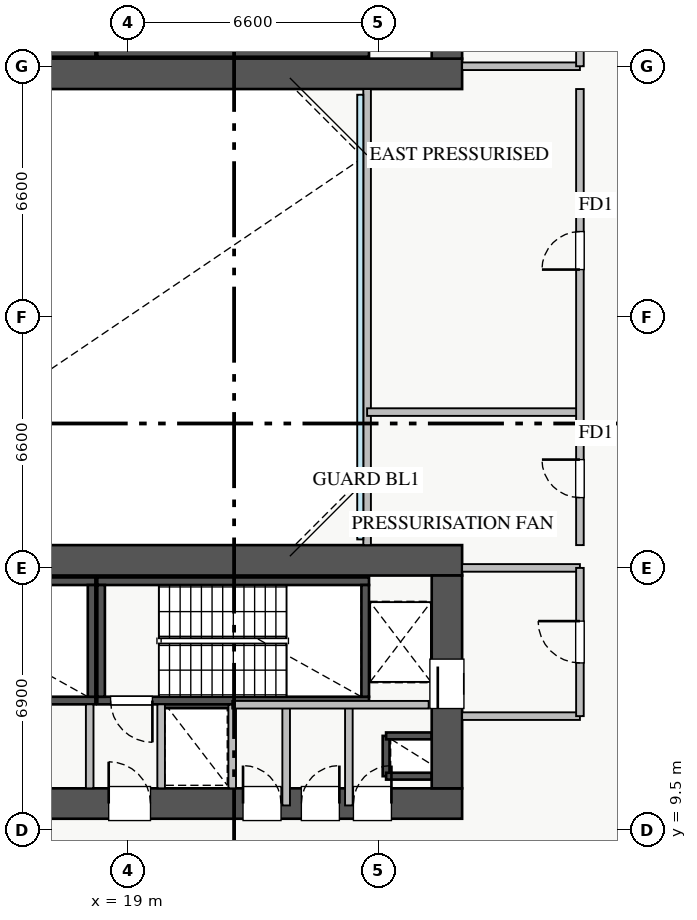
"""IFC4 building model, lengths in metres.
Left out: names, types, materials, properties, quantities, classifications, styles, units other than length and angle.
Written with IfcOpenShell. Run it as: python <this file> out.ifc"""

import sys

from ifc_helpers import new_model, si_unit, direction, frame, frame_2d, origin, place, context, subcontext, project, spatial, rectangle, extrude, source, transform, mapped, element, fill, save


model = new_model("IFC4")
c1 = context("Model", 3, precision=1e-05, world=origin(), true_north=direction((0.0, 1.0)))
c2 = subcontext(c1, "Body", "Model", "MODEL_VIEW")
j1 = project(units=[si_unit("LENGTHUNIT", "METRE"), si_unit("PLANEANGLEUNIT", "RADIAN")], contexts=[c1])
p1 = place(None, origin())
s1 = spatial("IfcSite", under=j1, at=p1, CompositionType="ELEMENT")
p2 = place(p1, origin())
s2 = spatial("IfcBuilding", under=s1, at=p2, CompositionType="ELEMENT")
p3 = place(p2, frame((0.0, 0.0, 92.5)))
s3 = spatial("IfcBuildingStorey", under=s2, at=p3, CompositionType="ELEMENT", Elevation=92.5)
p4 = place(p3, frame((25.8, 10.92, 0.0), z_axis=(0.0, 0.0, 1.0), x_axis=(0.0, 1.0, 0.0)))
e1 = element("IfcWall", 1, at=p4, inside=s3, PredefinedType="SHEAR", context=c2, shape_type="SweptSolid", body=[
    extrude(rectangle(XDim=1.06, YDim=0.18, at=frame_2d((0.53, 0.0))), origin(), (0.0, 0.0, 1.0), 4.32),
])
for number, where, z_axis, x_axis in (
    (2, (25.8, 11.98, 0.0), (0.0, 0.0, 1.0), (1.0, 0.0, 0.0)),
    (3, (25.8, 10.92, 0.0), (0.0, 0.0, 1.0), (1.0, 0.0, 0.0)),
):
    element("IfcWall", number, at=place(p3, frame(where, z_axis=z_axis, x_axis=x_axis)), inside=s3, PredefinedType="SHEAR", context=c2, shape_type="SweptSolid", body=[
        extrude(rectangle(XDim=1.2, YDim=0.18, at=frame_2d((0.6, 0.0))), origin(), (0.0, 0.0, 1.0), 4.32),
    ])
p5 = place(p3, frame((19.88, 12.8, 0.0), z_axis=(0.0, 0.0, 1.0), x_axis=(1.0, 0.0, 0.0)))
e4 = element("IfcWall", 4, at=p5, inside=s3, PredefinedType="SHEAR", context=c2, shape_type="SweptSolid", body=[
    extrude(rectangle(XDim=1.87, YDim=0.18, at=frame_2d((0.935, 0.0))), origin(), (0.0, 0.0, 1.0), 4.32),
])
p6 = place(p3, frame((11.0, 29.95, 0.0), z_axis=(0.0, 0.0, 1.0), x_axis=(1.0, 0.0, 0.0)))
e5 = element("IfcWall", 5, at=p6, inside=s3, PredefinedType="SHEAR", context=c2, shape_type="SweptSolid", body=[
    extrude(rectangle(XDim=7.15, YDim=0.2, at=frame_2d((3.575, 0.0))), origin(), (0.0, 0.0, 1.0), 4.5),
])
p7 = place(p3, frame((18.2, 29.95, 0.0), z_axis=(0.0, 0.0, 1.0), x_axis=(1.0, 0.0, 0.0)))
e6 = element("IfcWall", 6, at=p7, inside=s3, PredefinedType="SHEAR", context=c2, shape_type="SweptSolid", body=[
    extrude(rectangle(XDim=7.15, YDim=0.2, at=frame_2d((3.575, 0.0))), origin(), (0.0, 0.0, 1.0), 4.5),
])
p8 = place(p3, frame((11.0, 12.91, 0.0), z_axis=(0.0, 0.0, 1.0), x_axis=(1.0, 0.0, 0.0)))
e7 = element("IfcWall", 7, at=p8, inside=s3, PredefinedType="SHEAR", context=c2, shape_type="SweptSolid", body=[
    extrude(rectangle(XDim=7.15, YDim=0.2, at=frame_2d((3.575, 0.0))), origin(), (0.0, 0.0, 1.0), 4.5),
])
p9 = place(p8, frame((0.35, 0.0, 0.0)))
e8 = element("IfcOpeningElement", 8, at=p9, cuts=e7, PredefinedType="OPENING", context=c2, shape_type="SweptSolid", body=[
    extrude(rectangle(XDim=1.1, YDim=2.05, at=frame_2d((0.55, 1.025))), frame((0.0, 0.11, 0.0), z_axis=(0.0, -1.0, 0.0), x_axis=(1.0, 0.0, 0.0)), (0.0, 0.0, 1.0), 0.22),
])
p10 = place(p3, frame((11.0, 16.05, 0.0), z_axis=(0.0, 0.0, 1.0), x_axis=(1.0, 0.0, 0.0)))
e9 = element("IfcWall", 9, at=p10, inside=s3, PredefinedType="SHEAR", context=c2, shape_type="SweptSolid", body=[
    extrude(rectangle(XDim=7.15, YDim=0.2, at=frame_2d((3.575, 0.0))), origin(), (0.0, 0.0, 1.0), 4.5),
])
p11 = place(p3, frame((18.05, 13.01, 0.0), z_axis=(0.0, 0.0, 1.0), x_axis=(0.0, 1.0, 0.0)))
e10 = element("IfcWall", 10, at=p11, inside=s3, PredefinedType="SHEAR", context=c2, shape_type="SweptSolid", body=[
    extrude(rectangle(XDim=2.94, YDim=0.2, at=frame_2d((1.47, 0.0))), origin(), (0.0, 0.0, 1.0), 4.5),
])
p12 = place(p3, frame((18.2, 12.91, 0.0), z_axis=(0.0, 0.0, 1.0), x_axis=(1.0, 0.0, 0.0)))
e11 = element("IfcWall", 11, at=p12, inside=s3, PredefinedType="SHEAR", context=c2, shape_type="SweptSolid", body=[
    extrude(rectangle(XDim=7.15, YDim=0.2, at=frame_2d((3.575, 0.0))), origin(), (0.0, 0.0, 1.0), 4.5),
])
p13 = place(p12, frame((0.35, 0.0, 0.0)))
e12 = element("IfcOpeningElement", 12, at=p13, cuts=e11, PredefinedType="OPENING", context=c2, shape_type="SweptSolid", body=[
    extrude(rectangle(XDim=1.1, YDim=2.05, at=frame_2d((0.55, 1.025))), frame((0.0, 0.11, 0.0), z_axis=(0.0, -1.0, 0.0), x_axis=(1.0, 0.0, 0.0)), (0.0, 0.0, 1.0), 0.22),
])
p14 = place(p3, frame((18.2, 16.05, 0.0), z_axis=(0.0, 0.0, 1.0), x_axis=(1.0, 0.0, 0.0)))
e13 = element("IfcWall", 13, at=p14, inside=s3, PredefinedType="SHEAR", context=c2, shape_type="SweptSolid", body=[
    extrude(rectangle(XDim=7.15, YDim=0.2, at=frame_2d((3.575, 0.0))), origin(), (0.0, 0.0, 1.0), 4.5),
])
for number, where, z_axis, x_axis in (
    (14, (18.3, 13.01, 0.0), (0.0, 0.0, 1.0), (0.0, 1.0, 0.0)),
    (15, (25.25, 13.01, 0.0), (0.0, 0.0, 1.0), (0.0, 1.0, 0.0)),
):
    element("IfcWall", number, at=place(p3, frame(where, z_axis=z_axis, x_axis=x_axis)), inside=s3, PredefinedType="SHEAR", context=c2, shape_type="SweptSolid", body=[
        extrude(rectangle(XDim=2.94, YDim=0.2, at=frame_2d((1.47, 0.0))), origin(), (0.0, 0.0, 1.0), 4.5),
    ])
p15 = place(p3, frame((10.2, 29.4, 0.0), z_axis=(0.0, 0.0, 1.0), x_axis=(1.0, 0.0, 0.0)))
e16 = element("IfcWall", 16, at=p15, inside=s3, PredefinedType="SHEAR", context=c2, shape_type="SweptSolid", body=[
    extrude(rectangle(XDim=17.6, YDim=0.8, at=frame_2d((8.8, 0.0))), origin(), (0.0, 0.0, 1.0), 4.5),
])
p16 = place(p3, frame((27.4, 29.8, 0.0), z_axis=(0.0, 0.0, 1.0), x_axis=(0.0, 1.0, 0.0)))
e17 = element("IfcWall", 17, at=p16, inside=s3, PredefinedType="SHEAR", context=c2, shape_type="SweptSolid", body=[
    extrude(rectangle(XDim=5.6, YDim=0.8, at=frame_2d((2.8, 0.0))), origin(), (0.0, 0.0, 1.0), 4.5),
])
p17 = place(p16, frame((1.1, 0.0, 0.0)))
e18 = element("IfcOpeningElement", 18, at=p17, cuts=e17, PredefinedType="OPENING", context=c2, shape_type="SweptSolid", body=[
    extrude(rectangle(XDim=1.3, YDim=2.05, at=frame_2d((0.65, 1.025))), frame((0.0, 0.41, 0.0), z_axis=(0.0, -1.0, 0.0), x_axis=(1.0, 0.0, 0.0)), (0.0, 0.0, 1.0), 0.82),
])
p18 = place(p3, frame((10.2, 10.2, 0.0), z_axis=(0.0, 0.0, 1.0), x_axis=(1.0, 0.0, 0.0)))
e19 = element("IfcWall", 19, at=p18, inside=s3, PredefinedType="SHEAR", context=c2, shape_type="SweptSolid", body=[
    extrude(rectangle(XDim=17.6, YDim=0.8, at=frame_2d((8.8, 0.0))), origin(), (0.0, 0.0, 1.0), 4.5),
])
p19 = place(p18, frame((1.15, 0.0, 0.0)))
e20 = element("IfcOpeningElement", 20, at=p19, cuts=e19, PredefinedType="OPENING", context=c2, shape_type="SweptSolid", body=[
    extrude(rectangle(XDim=1.1, YDim=2.05, at=frame_2d((0.55, 1.025))), frame((0.0, 0.41, 0.0), z_axis=(0.0, -1.0, 0.0), x_axis=(1.0, 0.0, 0.0)), (0.0, 0.0, 1.0), 0.82),
])
p20 = place(p18, frame((8.3, 0.0, 0.0)))
e21 = element("IfcOpeningElement", 21, at=p20, cuts=e19, PredefinedType="OPENING", context=c2, shape_type="SweptSolid", body=[
    extrude(rectangle(XDim=1.1, YDim=2.05, at=frame_2d((0.55, 1.025))), frame((0.0, 0.41, 0.0), z_axis=(0.0, -1.0, 0.0), x_axis=(1.0, 0.0, 0.0)), (0.0, 0.0, 1.0), 0.82),
])
p21 = place(p18, frame((4.9, 0.0, 0.0)))
e22 = element("IfcOpeningElement", 22, at=p21, cuts=e19, PredefinedType="OPENING", context=c2, shape_type="SweptSolid", body=[
    extrude(rectangle(XDim=1.1, YDim=2.05, at=frame_2d((0.55, 1.025))), frame((0.0, 0.41, 0.0), z_axis=(0.0, -1.0, 0.0), x_axis=(1.0, 0.0, 0.0)), (0.0, 0.0, 1.0), 0.82),
])
p22 = place(p18, frame((2.85, 0.0, 0.0)))
e23 = element("IfcOpeningElement", 23, at=p22, cuts=e19, PredefinedType="OPENING", context=c2, shape_type="SweptSolid", body=[
    extrude(rectangle(XDim=1.1, YDim=2.05, at=frame_2d((0.55, 1.025))), frame((0.0, 0.41, 0.0), z_axis=(0.0, -1.0, 0.0), x_axis=(1.0, 0.0, 0.0)), (0.0, 0.0, 1.0), 0.82),
])
p23 = place(p18, frame((14.74, 0.0, 0.0)))
e24 = element("IfcOpeningElement", 24, at=p23, cuts=e19, PredefinedType="OPENING", context=c2, shape_type="SweptSolid", body=[
    extrude(rectangle(XDim=1.0, YDim=2.05, at=frame_2d((0.5, 1.025))), frame((0.0, 0.41, 0.0), z_axis=(0.0, -1.0, 0.0), x_axis=(1.0, 0.0, 0.0)), (0.0, 0.0, 1.0), 0.82),
])
p24 = place(p18, frame((11.835, 0.0, 0.0)))
e25 = element("IfcOpeningElement", 25, at=p24, cuts=e19, PredefinedType="OPENING", context=c2, shape_type="SweptSolid", body=[
    extrude(rectangle(XDim=1.0, YDim=2.05, at=frame_2d((0.5, 1.025))), frame((0.0, 0.41, 0.0), z_axis=(0.0, -1.0, 0.0), x_axis=(1.0, 0.0, 0.0)), (0.0, 0.0, 1.0), 0.82),
])
p25 = place(p18, frame((13.37, 0.0, 0.0)))
e26 = element("IfcOpeningElement", 26, at=p25, cuts=e19, PredefinedType="OPENING", context=c2, shape_type="SweptSolid", body=[
    extrude(rectangle(XDim=1.0, YDim=2.05, at=frame_2d((0.5, 1.025))), frame((0.0, 0.41, 0.0), z_axis=(0.0, -1.0, 0.0), x_axis=(1.0, 0.0, 0.0)), (0.0, 0.0, 1.0), 0.82),
])
p26 = place(p3, frame((10.2, 16.6, 0.0), z_axis=(0.0, 0.0, 1.0), x_axis=(1.0, 0.0, 0.0)))
e27 = element("IfcWall", 27, at=p26, inside=s3, PredefinedType="SHEAR", context=c2, shape_type="SweptSolid", body=[
    extrude(rectangle(XDim=17.6, YDim=0.8, at=frame_2d((8.8, 0.0))), origin(), (0.0, 0.0, 1.0), 4.5),
])
p27 = place(p3, frame((27.4, 10.6, 0.0), z_axis=(0.0, 0.0, 1.0), x_axis=(0.0, 1.0, 0.0)))
e28 = element("IfcWall", 28, at=p27, inside=s3, PredefinedType="SHEAR", context=c2, shape_type="SweptSolid", body=[
    extrude(rectangle(XDim=5.6, YDim=0.8, at=frame_2d((2.8, 0.0))), origin(), (0.0, 0.0, 1.0), 4.5),
])
p28 = place(p27, frame((2.1, 0.0, 0.0)))
e29 = element("IfcOpeningElement", 29, at=p28, cuts=e28, PredefinedType="OPENING", context=c2, shape_type="SweptSolid", body=[
    extrude(rectangle(XDim=1.3, YDim=2.05, at=frame_2d((0.65, 1.025))), frame((0.0, 0.41, 0.0), z_axis=(0.0, -1.0, 0.0), x_axis=(1.0, 0.0, 0.0)), (0.0, 0.0, 1.0), 0.82),
])
p29 = place(p3, frame((27.8, 29.6, 0.0), z_axis=(0.0, 0.0, 1.0), x_axis=(1.0, 0.0, 0.0)))
e30 = element("IfcWall", 30, at=p29, inside=s3, PredefinedType="PARTITIONING", context=c2, shape_type="SweptSolid", body=[
    extrude(rectangle(XDim=3.1, YDim=0.2, at=frame_2d((1.55, 0.0))), origin(), (0.0, 0.0, 1.0), 4.32),
])
p30 = place(p3, frame((30.9, 29.6, 0.0), z_axis=(0.0, 0.0, 1.0), x_axis=(0.0, 1.0, 0.0)))
e31 = element("IfcWall", 31, at=p30, inside=s3, PredefinedType="PARTITIONING", context=c2, shape_type="SweptSolid", body=[
    extrude(rectangle(XDim=3.9, YDim=0.2, at=frame_2d((1.95, 0.0))), origin(), (0.0, 0.0, 1.0), 4.32),
])
p31 = place(p30, frame((1.4, 0.0, 0.0)))
e32 = element("IfcOpeningElement", 32, at=p31, cuts=e31, PredefinedType="OPENING", context=c2, shape_type="SweptSolid", body=[
    extrude(rectangle(XDim=1.1, YDim=2.05, at=frame_2d((0.55, 1.025))), frame((0.0, 0.11, 0.0), z_axis=(0.0, -1.0, 0.0), x_axis=(1.0, 0.0, 0.0)), (0.0, 0.0, 1.0), 0.22),
])
for number, where, z_axis, x_axis in (
    (33, (27.8, 16.4, 0.0), (0.0, 0.0, 1.0), (1.0, 0.0, 0.0)),
    (34, (27.8, 12.5, 0.0), (0.0, 0.0, 1.0), (1.0, 0.0, 0.0)),
):
    element("IfcWall", number, at=place(p3, frame(where, z_axis=z_axis, x_axis=x_axis)), inside=s3, PredefinedType="PARTITIONING", context=c2, shape_type="SweptSolid", body=[
        extrude(rectangle(XDim=3.1, YDim=0.2, at=frame_2d((1.55, 0.0))), origin(), (0.0, 0.0, 1.0), 4.32),
    ])
p32 = place(p3, frame((30.9, 12.5, 0.0), z_axis=(0.0, 0.0, 1.0), x_axis=(0.0, 1.0, 0.0)))
e35 = element("IfcWall", 35, at=p32, inside=s3, PredefinedType="PARTITIONING", context=c2, shape_type="SweptSolid", body=[
    extrude(rectangle(XDim=3.9, YDim=0.2, at=frame_2d((1.95, 0.0))), origin(), (0.0, 0.0, 1.0), 4.32),
])
p33 = place(p32, frame((1.4, 0.0, 0.0)))
e36 = element("IfcOpeningElement", 36, at=p33, cuts=e35, PredefinedType="OPENING", context=c2, shape_type="SweptSolid", body=[
    extrude(rectangle(XDim=1.1, YDim=2.05, at=frame_2d((0.55, 1.025))), frame((0.0, 0.11, 0.0), z_axis=(0.0, -1.0, 0.0), x_axis=(1.0, 0.0, 0.0)), (0.0, 0.0, 1.0), 0.22),
])
for number, where, z_axis, x_axis in (
    (37, (18.0, 10.6, 0.0), (0.0, 0.0, 1.0), (0.0, 1.0, 0.0)),
    (38, (19.88, 10.6, 0.0), (0.0, 0.0, 1.0), (0.0, 1.0, 0.0)),
):
    element("IfcWall", number, at=place(p3, frame(where, z_axis=z_axis, x_axis=x_axis)), inside=s3, PredefinedType="PARTITIONING", context=c2, shape_type="SweptSolid", body=[
        extrude(rectangle(XDim=2.21, YDim=0.2, at=frame_2d((1.105, 0.0))), origin(), (0.0, 0.0, 1.0), 4.32),
    ])
p34 = place(p3, frame((24.82, 10.15, 0.0), z_axis=(0.0, 0.0, 1.0), x_axis=(0.0, 1.0, 0.0)))
e39 = element("IfcWall", 39, at=p34, inside=s3, PredefinedType="PARTITIONING", context=c2, shape_type="SweptSolid", body=[
    extrude(rectangle(XDim=2.65, YDim=0.2, at=frame_2d((1.325, 0.0))), origin(), (0.0, 0.0, 1.0), 4.32),
])
p35 = place(p3, frame((21.75, 10.6, 0.0), z_axis=(0.0, 0.0, 1.0), x_axis=(0.0, 1.0, 0.0)))
e40 = element("IfcWall", 40, at=p35, inside=s3, PredefinedType="PARTITIONING", context=c2, shape_type="SweptSolid", body=[
    extrude(rectangle(XDim=2.2, YDim=0.2, at=frame_2d((1.1, 0.0))), origin(), (0.0, 0.0, 1.0), 4.32),
])
p36 = place(p3, frame((23.17, 10.15, 0.0), z_axis=(0.0, 0.0, 1.0), x_axis=(0.0, 1.0, 0.0)))
e41 = element("IfcWall", 41, at=p36, inside=s3, PredefinedType="PARTITIONING", context=c2, shape_type="SweptSolid", body=[
    extrude(rectangle(XDim=2.65, YDim=0.2, at=frame_2d((1.325, 0.0))), origin(), (0.0, 0.0, 1.0), 4.32),
])
p37 = place(p3, frame((21.75, 12.8, 0.0), z_axis=(0.0, 0.0, 1.0), x_axis=(1.0, 0.0, 0.0)))
e42 = element("IfcWall", 42, at=p37, inside=s3, PredefinedType="PARTITIONING", context=c2, shape_type="SweptSolid", body=[
    extrude(rectangle(XDim=5.17, YDim=0.2, at=frame_2d((2.585, 0.0))), origin(), (0.0, 0.0, 1.0), 4.32),
])
p38 = place(p3, frame((25.3, 17.0, 0.0), z_axis=(0.0, 0.0, 1.0), x_axis=(0.0, 1.0, 0.0)))
e43 = element("IfcWall", 43, at=p38, inside=s3, PredefinedType="PARTITIONING", context=c2, shape_type="SweptSolid", body=[
    extrude(rectangle(XDim=12.0, YDim=0.2, at=frame_2d((6.0, 0.0))), origin(), (0.0, 0.0, 1.0), 2.515),
])
p39 = place(p3, frame((25.3, 20.5, 0.0), z_axis=(0.0, 0.0, 1.0), x_axis=(1.0, 0.0, 0.0)))
e44 = element("IfcWall", 44, at=p39, inside=s3, PredefinedType="PARTITIONING", context=c2, shape_type="SweptSolid", body=[
    extrude(rectangle(XDim=5.6, YDim=0.2, at=frame_2d((2.8, 0.0))), origin(), (0.0, 0.0, 1.0), 4.32),
])
p40 = place(p3, frame((30.9, 17.0, 0.0), z_axis=(0.0, 0.0, 1.0), x_axis=(0.0, 1.0, 0.0)))
e45 = element("IfcWall", 45, at=p40, inside=s3, PredefinedType="PARTITIONING", context=c2, shape_type="SweptSolid", body=[
    extrude(rectangle(XDim=12.0, YDim=0.2, at=frame_2d((6.0, 0.0))), origin(), (0.0, 0.0, 1.0), 4.32),
])
p41 = place(p40, frame((1.25, 0.0, 0.0)))
e46 = element("IfcOpeningElement", 46, at=p41, cuts=e45, PredefinedType="OPENING", context=c2, shape_type="SweptSolid", body=[
    extrude(rectangle(XDim=1.0, YDim=2.05, at=frame_2d((0.5, 1.025))), frame((0.0, 0.11, 0.0), z_axis=(0.0, -1.0, 0.0), x_axis=(1.0, 0.0, 0.0)), (0.0, 0.0, 1.0), 0.22),
])
p42 = place(p40, frame((7.25, 0.0, 0.0)))
e47 = element("IfcOpeningElement", 47, at=p42, cuts=e45, PredefinedType="OPENING", context=c2, shape_type="SweptSolid", body=[
    extrude(rectangle(XDim=1.0, YDim=2.05, at=frame_2d((0.5, 1.025))), frame((0.0, 0.11, 0.0), z_axis=(0.0, -1.0, 0.0), x_axis=(1.0, 0.0, 0.0)), (0.0, 0.0, 1.0), 0.22),
])
m1 = source(origin(), c2, "Body", "SweptSolid", [
    extrude(rectangle(XDim=1.3, YDim=2.05, at=frame_2d((0.65, 1.025))), frame((0.0, 0.025, 0.0), z_axis=(0.0, -1.0, 0.0), x_axis=(1.0, 0.0, 0.0)), (0.0, 0.0, 1.0), 0.05),
])
p43 = place(p28, origin())
e48 = element("IfcDoor", 48, at=p43, inside=s3, OperationType="SLIDING_TO_RIGHT", PredefinedType="DOOR", context=c2, shape_type="MappedRepresentation", body=[
    mapped(m1, transform((0.0, 0.0, 0.0), x_axis=(1.0, 0.0, 0.0), y_axis=(0.0, 1.0, 0.0), z_axis=(0.0, 0.0, 1.0), scale=1.0)),
])
fill(e29, e48)
m2 = source(origin(), c2, "Body", "SweptSolid", [
    extrude(rectangle(XDim=1.1, YDim=2.05, at=frame_2d((0.55, 1.025))), frame((0.0, 0.025, 0.0), z_axis=(0.0, -1.0, 0.0), x_axis=(1.0, 0.0, 0.0)), (0.0, 0.0, 1.0), 0.05),
])
p44 = place(p20, origin())
e49 = element("IfcDoor", 49, at=p44, inside=s3, OperationType="SINGLE_SWING_LEFT", PredefinedType="DOOR", context=c2, shape_type="MappedRepresentation", body=[
    mapped(m2, transform((0.0, 0.0, 0.0), x_axis=(1.0, 0.0, 0.0), y_axis=(0.0, 1.0, 0.0), z_axis=(0.0, 0.0, 1.0), scale=1.0)),
])
fill(e21, e49)
p45 = place(p13, frame((1.1, 0.0, 0.0), z_axis=(0.0, 0.0, 1.0), x_axis=(-1.0, 0.0, 0.0)))
e50 = element("IfcDoor", 50, at=p45, inside=s3, OperationType="SINGLE_SWING_RIGHT", PredefinedType="DOOR", context=c2, shape_type="MappedRepresentation", body=[
    mapped(m2, transform((0.0, 0.0, 0.0), x_axis=(1.0, 0.0, 0.0), y_axis=(0.0, 1.0, 0.0), z_axis=(0.0, 0.0, 1.0), scale=1.0)),
])
fill(e12, e50)
m3 = source(origin(), c2, "Body", "SweptSolid", [
    extrude(rectangle(XDim=1.0, YDim=2.05, at=frame_2d((0.5, 1.025))), frame((0.0, 0.025, 0.0), z_axis=(0.0, -1.0, 0.0), x_axis=(1.0, 0.0, 0.0)), (0.0, 0.0, 1.0), 0.05),
])
p46 = place(p23, origin())
e51 = element("IfcDoor", 51, at=p46, inside=s3, OperationType="SINGLE_SWING_RIGHT", PredefinedType="DOOR", context=c2, shape_type="MappedRepresentation", body=[
    mapped(m3, transform((0.0, 0.0, 0.0), x_axis=(1.0, 0.0, 0.0), y_axis=(0.0, 1.0, 0.0), z_axis=(0.0, 0.0, 1.0), scale=1.0)),
])
fill(e24, e51)
p47 = place(p24, origin())
e52 = element("IfcDoor", 52, at=p47, inside=s3, OperationType="SINGLE_SWING_LEFT", PredefinedType="DOOR", context=c2, shape_type="MappedRepresentation", body=[
    mapped(m3, transform((0.0, 0.0, 0.0), x_axis=(1.0, 0.0, 0.0), y_axis=(0.0, 1.0, 0.0), z_axis=(0.0, 0.0, 1.0), scale=1.0)),
])
fill(e25, e52)
p48 = place(p25, origin())
e53 = element("IfcDoor", 53, at=p48, inside=s3, OperationType="SINGLE_SWING_RIGHT", PredefinedType="DOOR", context=c2, shape_type="MappedRepresentation", body=[
    mapped(m3, transform((0.0, 0.0, 0.0), x_axis=(1.0, 0.0, 0.0), y_axis=(0.0, 1.0, 0.0), z_axis=(0.0, 0.0, 1.0), scale=1.0)),
])
fill(e26, e53)
p49 = place(p33, origin())
e54 = element("IfcDoor", 54, at=p49, inside=s3, OperationType="SINGLE_SWING_RIGHT", PredefinedType="DOOR", context=c2, shape_type="MappedRepresentation", body=[
    mapped(m2, transform((0.0, 0.0, 0.0), x_axis=(1.0, 0.0, 0.0), y_axis=(0.0, 1.0, 0.0), z_axis=(0.0, 0.0, 1.0), scale=1.0)),
])
fill(e36, e54)
p50 = place(p41, origin())
e55 = element("IfcDoor", 55, at=p50, inside=s3, OperationType="SINGLE_SWING_RIGHT", PredefinedType="DOOR", context=c2, shape_type="MappedRepresentation", body=[
    mapped(m3, transform((0.0, 0.0, 0.0), x_axis=(1.0, 0.0, 0.0), y_axis=(0.0, 1.0, 0.0), z_axis=(0.0, 0.0, 1.0), scale=1.0)),
])
fill(e46, e55)
p51 = place(p42, origin())
e56 = element("IfcDoor", 56, at=p51, inside=s3, OperationType="SINGLE_SWING_LEFT", PredefinedType="DOOR", context=c2, shape_type="MappedRepresentation", body=[
    mapped(m3, transform((0.0, 0.0, 0.0), x_axis=(1.0, 0.0, 0.0), y_axis=(0.0, 1.0, 0.0), z_axis=(0.0, 0.0, 1.0), scale=1.0)),
])
fill(e47, e56)
save(model, sys.argv[1])
